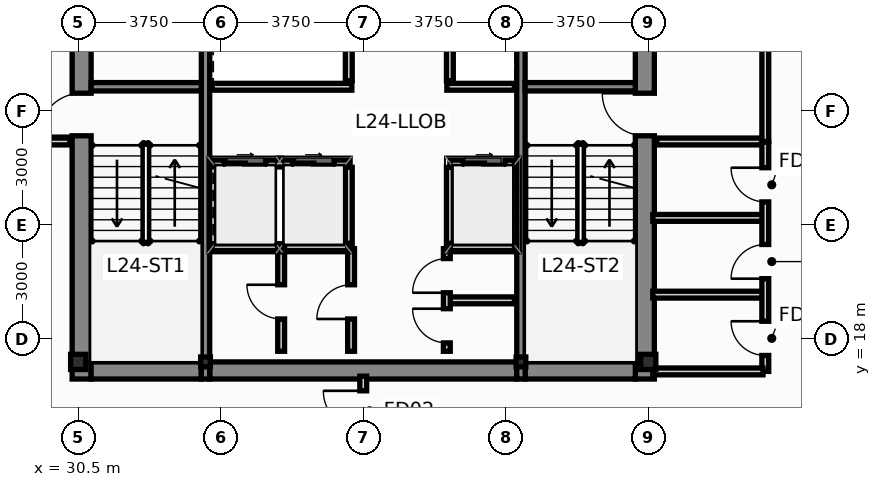
"""IFC4 building model, lengths in metres.
Left out: names, types, materials, properties, quantities, classifications, styles, units other than length and angle.
Written with IfcOpenShell. Run it as: python <this file> out.ifc"""

import sys

from ifc_helpers import new_model, si_unit, direction, frame, frame_2d, origin, origin_2d, place, context, subcontext, project, spatial, rectangle, i_section, extrude, source, transform, mapped, element, fill, save


model = new_model("IFC4")
c1 = context("Model", 3, precision=1e-05, world=origin(), true_north=direction((0.0, 1.0)))
c2 = subcontext(c1, "Body", "Model", "MODEL_VIEW")
j1 = project(units=[si_unit("LENGTHUNIT", "METRE"), si_unit("PLANEANGLEUNIT", "RADIAN")], contexts=[c1])
p1 = place(None, origin())
s1 = spatial("IfcSite", under=j1, at=p1, CompositionType="ELEMENT")
p2 = place(p1, origin())
s2 = spatial("IfcBuilding", under=s1, at=p2, CompositionType="ELEMENT")
p3 = place(p2, frame((0.0, 0.0, 94.45)))
s3 = spatial("IfcBuildingStorey", under=s2, at=p3, CompositionType="ELEMENT", Elevation=94.45)
m1 = source(origin(), c2, "Body", "SweptSolid", [
    extrude(i_section(OverallWidth=0.4, OverallDepth=0.4, WebThickness=0.02, FlangeThickness=0.032, at=origin_2d()), origin(), (0.0, 0.0, 1.0), 3.65),
])
for number, where, z_axis, x_axis in (
    (1, (30.5, 17.4, 0.0), (0.0, 0.0, 1.0), (1.0, 0.0, 0.0)),
    (2, (45.5, 17.4, 0.0), (0.0, 0.0, 1.0), (1.0, 0.0, 0.0)),
):
    element("IfcColumn", number, at=place(p3, frame(where, z_axis=z_axis, x_axis=x_axis)), inside=s3, PredefinedType="COLUMN", context=c2, shape_type="MappedRepresentation", body=[
        mapped(m1, transform((0.0, 0.0, 0.0), scale=1.0)),
    ])
m2 = source(origin(), c2, "Body", "SweptSolid", [
    extrude(i_section(OverallWidth=0.256, OverallDepth=0.26, WebThickness=0.01, FlangeThickness=0.017, at=origin_2d()), origin(), (0.0, 0.0, 1.0), 3.65),
])
for number, where, z_axis, x_axis in (
    (3, (33.85, 17.4, 0.0), (0.0, 0.0, 1.0), (1.0, 0.0, 0.0)),
    (4, (42.15, 17.4, 0.0), (0.0, 0.0, 1.0), (1.0, 0.0, 0.0)),
):
    element("IfcColumn", number, at=place(p3, frame(where, z_axis=z_axis, x_axis=x_axis)), inside=s3, PredefinedType="COLUMN", context=c2, shape_type="MappedRepresentation", body=[
        mapped(m2, transform((0.0, 0.0, 0.0), scale=1.0)),
    ])
p4 = place(p3, frame((30.59, 16.95, 0.0), z_axis=(0.0, 0.0, 1.0), x_axis=(0.0, 1.0, 0.0)))
e5 = element("IfcWall", 5, at=p4, inside=s3, PredefinedType="SHEAR", context=c2, shape_type="SweptSolid", body=[
    extrude(rectangle(XDim=13.275, YDim=0.5, at=frame_2d((6.638, 0.0))), origin(), (0.0, 0.0, 1.0), 3.65),
])
p5 = place(p4, frame((6.4, 0.0, 0.0)))
e6 = element("IfcOpeningElement", 6, at=p5, cuts=e5, PredefinedType="OPENING", context=c2, shape_type="SweptSolid", body=[
    extrude(rectangle(XDim=1.12, YDim=2.15, at=frame_2d((0.56, 1.075))), frame((0.0, 0.262, 0.0), z_axis=(0.0, -1.0, 0.0), x_axis=(1.0, 0.0, 0.0)), (0.0, 0.0, 1.0), 0.524),
])
p6 = place(p4, frame((10.85, 0.0, 0.0)))
e7 = element("IfcOpeningElement", 7, at=p6, cuts=e5, PredefinedType="OPENING", context=c2, shape_type="SweptSolid", body=[
    extrude(rectangle(XDim=1.2, YDim=2.2, at=frame_2d((0.6, 1.1))), frame((0.0, 0.262, 0.0), z_axis=(0.0, -1.0, 0.0), x_axis=(1.0, 0.0, 0.0)), (0.0, 0.0, 1.0), 0.524),
])
p7 = place(p3, frame((45.41, 16.95, 0.0), z_axis=(0.0, 0.0, 1.0), x_axis=(0.0, 1.0, 0.0)))
e8 = element("IfcWall", 8, at=p7, inside=s3, PredefinedType="SHEAR", context=c2, shape_type="SweptSolid", body=[
    extrude(rectangle(XDim=13.275, YDim=0.5, at=frame_2d((6.638, 0.0))), origin(), (0.0, 0.0, 1.0), 3.65),
])
p8 = place(p7, frame((6.4, 0.0, 0.0)))
e9 = element("IfcOpeningElement", 9, at=p8, cuts=e8, PredefinedType="OPENING", context=c2, shape_type="SweptSolid", body=[
    extrude(rectangle(XDim=1.12, YDim=2.15, at=frame_2d((0.56, 1.075))), frame((0.0, 0.262, 0.0), z_axis=(0.0, -1.0, 0.0), x_axis=(1.0, 0.0, 0.0)), (0.0, 0.0, 1.0), 0.524),
])
p9 = place(p7, frame((10.85, 0.0, 0.0)))
e10 = element("IfcOpeningElement", 10, at=p9, cuts=e8, PredefinedType="OPENING", context=c2, shape_type="SweptSolid", body=[
    extrude(rectangle(XDim=1.2, YDim=2.2, at=frame_2d((0.6, 1.1))), frame((0.0, 0.262, 0.0), z_axis=(0.0, -1.0, 0.0), x_axis=(1.0, 0.0, 0.0)), (0.0, 0.0, 1.0), 0.524),
])
p10 = place(p3, frame((30.84, 17.175, 0.0), z_axis=(0.0, 0.0, 1.0), x_axis=(1.0, 0.0, 0.0)))
e11 = element("IfcWall", 11, at=p10, inside=s3, PredefinedType="SHEAR", context=c2, shape_type="SweptSolid", body=[
    extrude(rectangle(XDim=2.9, YDim=0.45, at=frame_2d((1.45, 0.0))), origin(), (0.0, 0.0, 1.0), 3.65),
])
p11 = place(p3, frame((33.96, 17.175, 0.0), z_axis=(0.0, 0.0, 1.0), x_axis=(1.0, 0.0, 0.0)))
e12 = element("IfcWall", 12, at=p11, inside=s3, PredefinedType="SHEAR", context=c2, shape_type="SweptSolid", body=[
    extrude(rectangle(XDim=8.08, YDim=0.45, at=frame_2d((4.04, 0.0))), origin(), (0.0, 0.0, 1.0), 3.65),
])
p12 = place(p3, frame((42.26, 17.175, 0.0), z_axis=(0.0, 0.0, 1.0), x_axis=(1.0, 0.0, 0.0)))
e13 = element("IfcWall", 13, at=p12, inside=s3, PredefinedType="SHEAR", context=c2, shape_type="SweptSolid", body=[
    extrude(rectangle(XDim=2.9, YDim=0.45, at=frame_2d((1.45, 0.0))), origin(), (0.0, 0.0, 1.0), 3.65),
])
for number, where, z_axis, x_axis in (
    (14, (33.85, 16.95, 0.0), (0.0, 0.0, 1.0), (0.0, 1.0, 0.0)),
    (15, (42.15, 16.95, 0.0), (0.0, 0.0, 1.0), (0.0, 1.0, 0.0)),
):
    element("IfcWall", number, at=place(p3, frame(where, z_axis=z_axis, x_axis=x_axis)), inside=s3, PredefinedType="SHEAR", context=c2, shape_type="SweptSolid", body=[
        extrude(rectangle(XDim=13.275, YDim=0.22, at=frame_2d((6.638, 0.0))), origin(), (0.0, 0.0, 1.0), 3.65),
    ])
for number, where, z_axis, x_axis in (
    (16, (30.84, 24.64, 0.0), (0.0, 0.0, 1.0), (1.0, 0.0, 0.0)),
    (17, (42.26, 24.64, 0.0), (0.0, 0.0, 1.0), (1.0, 0.0, 0.0)),
):
    element("IfcWall", number, at=place(p3, frame(where, z_axis=z_axis, x_axis=x_axis)), inside=s3, PredefinedType="SHEAR", context=c2, shape_type="SweptSolid", body=[
        extrude(rectangle(XDim=2.9, YDim=0.22, at=frame_2d((1.45, 0.0))), origin(), (0.0, 0.0, 1.0), 3.65),
    ])
p13 = place(p3, frame((34.02, 22.62, 0.0), z_axis=(0.0, 0.0, 1.0), x_axis=(1.0, 0.0, 0.0)))
e18 = element("IfcWall", 18, at=p13, inside=s3, PredefinedType="PARTITIONING", context=c2, shape_type="SweptSolid", body=[
    extrude(rectangle(XDim=3.6, YDim=0.18, at=frame_2d((1.8, 0.0))), origin(), (0.0, 0.0, 1.0), 3.4),
])
p14 = place(p13, frame((0.32, 0.0, 0.0)))
e19 = element("IfcOpeningElement", 19, at=p14, cuts=e18, PredefinedType="OPENING", context=c2, shape_type="SweptSolid", body=[
    extrude(rectangle(XDim=1.1, YDim=2.2, at=frame_2d((0.55, 1.1))), frame((0.0, 0.102, 0.0), z_axis=(0.0, -1.0, 0.0), x_axis=(1.0, 0.0, 0.0)), (0.0, 0.0, 1.0), 0.204),
])
p15 = place(p13, frame((2.12, 0.0, 0.0)))
e20 = element("IfcOpeningElement", 20, at=p15, cuts=e18, PredefinedType="OPENING", context=c2, shape_type="SweptSolid", body=[
    extrude(rectangle(XDim=1.1, YDim=2.2, at=frame_2d((0.55, 1.1))), frame((0.0, 0.102, 0.0), z_axis=(0.0, -1.0, 0.0), x_axis=(1.0, 0.0, 0.0)), (0.0, 0.0, 1.0), 0.204),
])
p16 = place(p3, frame((40.28, 22.62, 0.0), z_axis=(0.0, 0.0, 1.0), x_axis=(1.0, 0.0, 0.0)))
e21 = element("IfcWall", 21, at=p16, inside=s3, PredefinedType="PARTITIONING", context=c2, shape_type="SweptSolid", body=[
    extrude(rectangle(XDim=1.7, YDim=0.18, at=frame_2d((0.85, 0.0))), origin(), (0.0, 0.0, 1.0), 3.4),
])
p17 = place(p16, frame((0.35, 0.0, 0.0)))
e22 = element("IfcOpeningElement", 22, at=p17, cuts=e21, PredefinedType="OPENING", context=c2, shape_type="SweptSolid", body=[
    extrude(rectangle(XDim=1.1, YDim=2.2, at=frame_2d((0.55, 1.1))), frame((0.0, 0.102, 0.0), z_axis=(0.0, -1.0, 0.0), x_axis=(1.0, 0.0, 0.0)), (0.0, 0.0, 1.0), 0.204),
])
for number, where, z_axis, x_axis in (
    (23, (37.62, 20.52, 0.0), (0.0, 0.0, 1.0), (0.0, 1.0, 0.0)),
    (24, (40.28, 20.52, 0.0), (0.0, 0.0, 1.0), (0.0, 1.0, 0.0)),
    (25, (37.62, 24.8, 0.0), (0.0, 0.0, 1.0), (0.0, 1.0, 0.0)),
    (26, (40.28, 24.8, 0.0), (0.0, 0.0, 1.0), (0.0, 1.0, 0.0)),
):
    element("IfcWall", number, at=place(p3, frame(where, z_axis=z_axis, x_axis=x_axis)), inside=s3, PredefinedType="PARTITIONING", context=c2, shape_type="SweptSolid", body=[
        extrude(rectangle(XDim=2.0, YDim=0.18, at=frame_2d((1.0, 0.0))), origin(), (0.0, 0.0, 1.0), 3.4),
    ])
p18 = place(p3, frame((34.02, 24.64, 0.0), z_axis=(0.0, 0.0, 1.0), x_axis=(1.0, 0.0, 0.0)))
e27 = element("IfcWall", 27, at=p18, inside=s3, PredefinedType="PARTITIONING", context=c2, shape_type="SweptSolid", body=[
    extrude(rectangle(XDim=3.68, YDim=0.18, at=frame_2d((1.84, 0.0))), origin(), (0.0, 0.0, 1.0), 3.4),
])
p19 = place(p3, frame((40.2, 24.64, 0.0), z_axis=(0.0, 0.0, 1.0), x_axis=(1.0, 0.0, 0.0)))
e28 = element("IfcWall", 28, at=p19, inside=s3, PredefinedType="PARTITIONING", context=c2, shape_type="SweptSolid", body=[
    extrude(rectangle(XDim=1.78, YDim=0.18, at=frame_2d((0.89, 0.0))), origin(), (0.0, 0.0, 1.0), 3.4),
])
p20 = place(p3, frame((27.52, 23.2, 0.0), z_axis=(0.0, 0.0, 1.0), x_axis=(1.0, 0.0, 0.0)))
e29 = element("IfcWall", 29, at=p20, inside=s3, PredefinedType="PARTITIONING", context=c2, shape_type="SweptSolid", body=[
    extrude(rectangle(XDim=2.76, YDim=0.18, at=frame_2d((1.38, 0.0))), origin(), (0.0, 0.0, 1.0), 3.4),
])
p21 = place(p3, frame((48.58, 23.2, 0.0), z_axis=(0.0, 0.0, 1.0), x_axis=(0.0, 1.0, 0.0)))
e30 = element("IfcWall", 30, at=p21, inside=s3, PredefinedType="PARTITIONING", context=c2, shape_type="SweptSolid", body=[
    extrude(rectangle(XDim=6.4, YDim=0.18, at=frame_2d((3.2, 0.0))), origin(), (0.0, 0.0, 1.0), 3.026),
])
p22 = place(p21, frame((2.65, 0.0, 0.0)))
e31 = element("IfcOpeningElement", 31, at=p22, cuts=e30, PredefinedType="OPENING", context=c2, shape_type="SweptSolid", body=[
    extrude(rectangle(XDim=1.05, YDim=2.15, at=frame_2d((0.525, 1.075))), frame((0.0, 0.102, 0.0), z_axis=(0.0, -1.0, 0.0), x_axis=(1.0, 0.0, 0.0)), (0.0, 0.0, 1.0), 0.204),
])
p23 = place(p3, frame((45.72, 23.2, 0.0), z_axis=(0.0, 0.0, 1.0), x_axis=(1.0, 0.0, 0.0)))
e32 = element("IfcWall", 32, at=p23, inside=s3, PredefinedType="PARTITIONING", context=c2, shape_type="SweptSolid", body=[
    extrude(rectangle(XDim=2.76, YDim=0.18, at=frame_2d((1.38, 0.0))), origin(), (0.0, 0.0, 1.0), 3.4),
])
p24 = place(p3, frame((34.02, 20.42, 0.0), z_axis=(0.0, 0.0, 1.0), x_axis=(1.0, 0.0, 0.0)))
e33 = element("IfcWall", 33, at=p24, inside=s3, PredefinedType="PARTITIONING", context=c2, shape_type="SweptSolid", body=[
    extrude(rectangle(XDim=3.64, YDim=0.18, at=frame_2d((1.82, 0.0))), origin(), (0.0, 0.0, 1.0), 3.4),
])
p25 = place(p3, frame((40.22, 20.42, 0.0), z_axis=(0.0, 0.0, 1.0), x_axis=(1.0, 0.0, 0.0)))
e34 = element("IfcWall", 34, at=p25, inside=s3, PredefinedType="PARTITIONING", context=c2, shape_type="SweptSolid", body=[
    extrude(rectangle(XDim=1.76, YDim=0.18, at=frame_2d((0.88, 0.0))), origin(), (0.0, 0.0, 1.0), 3.4),
])
p26 = place(p3, frame((35.84, 17.68, 0.0), z_axis=(0.0, 0.0, 1.0), x_axis=(0.0, 1.0, 0.0)))
e35 = element("IfcWall", 35, at=p26, inside=s3, PredefinedType="PARTITIONING", context=c2, shape_type="SweptSolid", body=[
    extrude(rectangle(XDim=2.7, YDim=0.18, at=frame_2d((1.35, 0.0))), origin(), (0.0, 0.0, 1.0), 3.4),
])
p27 = place(p26, frame((0.85, 0.0, 0.0)))
e36 = element("IfcOpeningElement", 36, at=p27, cuts=e35, PredefinedType="OPENING", context=c2, shape_type="SweptSolid", body=[
    extrude(rectangle(XDim=0.9, YDim=2.1, at=frame_2d((0.45, 1.05))), frame((0.0, 0.102, 0.0), z_axis=(0.0, -1.0, 0.0), x_axis=(1.0, 0.0, 0.0)), (0.0, 0.0, 1.0), 0.204),
])
p28 = place(p3, frame((37.68, 17.68, 0.0), z_axis=(0.0, 0.0, 1.0), x_axis=(0.0, 1.0, 0.0)))
e37 = element("IfcWall", 37, at=p28, inside=s3, PredefinedType="PARTITIONING", context=c2, shape_type="SweptSolid", body=[
    extrude(rectangle(XDim=2.7, YDim=0.18, at=frame_2d((1.35, 0.0))), origin(), (0.0, 0.0, 1.0), 3.4),
])
p29 = place(p28, frame((0.85, 0.0, 0.0)))
e38 = element("IfcOpeningElement", 38, at=p29, cuts=e37, PredefinedType="OPENING", context=c2, shape_type="SweptSolid", body=[
    extrude(rectangle(XDim=0.9, YDim=2.1, at=frame_2d((0.45, 1.05))), frame((0.0, 0.102, 0.0), z_axis=(0.0, -1.0, 0.0), x_axis=(1.0, 0.0, 0.0)), (0.0, 0.0, 1.0), 0.204),
])
p30 = place(p3, frame((40.28, 19.02, 0.0), z_axis=(0.0, 0.0, 1.0), x_axis=(1.0, 0.0, 0.0)))
e39 = element("IfcWall", 39, at=p30, inside=s3, PredefinedType="PARTITIONING", context=c2, shape_type="SweptSolid", body=[
    extrude(rectangle(XDim=1.7, YDim=0.18, at=frame_2d((0.85, 0.0))), origin(), (0.0, 0.0, 1.0), 3.4),
])
p31 = place(p3, frame((40.2, 17.68, 0.0), z_axis=(0.0, 0.0, 1.0), x_axis=(0.0, 1.0, 0.0)))
e40 = element("IfcWall", 40, at=p31, inside=s3, PredefinedType="PARTITIONING", context=c2, shape_type="SweptSolid", body=[
    extrude(rectangle(XDim=2.7, YDim=0.18, at=frame_2d((1.35, 0.0))), origin(), (0.0, 0.0, 1.0), 3.4),
])
p32 = place(p31, frame((0.22, 0.0, 0.0)))
e41 = element("IfcOpeningElement", 41, at=p32, cuts=e40, PredefinedType="OPENING", context=c2, shape_type="SweptSolid", body=[
    extrude(rectangle(XDim=0.9, YDim=2.1, at=frame_2d((0.45, 1.05))), frame((0.0, 0.102, 0.0), z_axis=(0.0, -1.0, 0.0), x_axis=(1.0, 0.0, 0.0)), (0.0, 0.0, 1.0), 0.204),
])
p33 = place(p31, frame((1.54, 0.0, 0.0)))
e42 = element("IfcOpeningElement", 42, at=p33, cuts=e40, PredefinedType="OPENING", context=c2, shape_type="SweptSolid", body=[
    extrude(rectangle(XDim=0.9, YDim=2.1, at=frame_2d((0.45, 1.05))), frame((0.0, 0.102, 0.0), z_axis=(0.0, -1.0, 0.0), x_axis=(1.0, 0.0, 0.0)), (0.0, 0.0, 1.0), 0.204),
])
for number, where, z_axis, x_axis in (
    (43, (45.62, 19.17, 0.0), (0.0, 0.0, 1.0), (1.0, 0.0, 0.0)),
    (44, (45.62, 21.19, 0.0), (0.0, 0.0, 1.0), (1.0, 0.0, 0.0)),
):
    element("IfcWall", number, at=place(p3, frame(where, z_axis=z_axis, x_axis=x_axis)), inside=s3, PredefinedType="PARTITIONING", context=c2, shape_type="SweptSolid", body=[
        extrude(rectangle(XDim=2.9, YDim=0.18, at=frame_2d((1.45, 0.0))), origin(), (0.0, 0.0, 1.0), 3.4),
    ])
p34 = place(p3, frame((48.58, 17.15, 0.0), z_axis=(0.0, 0.0, 1.0), x_axis=(0.0, 1.0, 0.0)))
e45 = element("IfcWall", 45, at=p34, inside=s3, PredefinedType="PARTITIONING", context=c2, shape_type="SweptSolid", body=[
    extrude(rectangle(XDim=6.03, YDim=0.18, at=frame_2d((3.015, 0.0))), origin(), (0.0, 0.0, 1.0), 3.026),
])
p35 = place(p34, frame((0.42, 0.0, 0.0)))
e46 = element("IfcOpeningElement", 46, at=p35, cuts=e45, PredefinedType="OPENING", context=c2, shape_type="SweptSolid", body=[
    extrude(rectangle(XDim=0.9, YDim=2.1, at=frame_2d((0.45, 1.05))), frame((0.0, 0.102, 0.0), z_axis=(0.0, -1.0, 0.0), x_axis=(1.0, 0.0, 0.0)), (0.0, 0.0, 1.0), 0.204),
])
p36 = place(p34, frame((2.44, 0.0, 0.0)))
e47 = element("IfcOpeningElement", 47, at=p36, cuts=e45, PredefinedType="OPENING", context=c2, shape_type="SweptSolid", body=[
    extrude(rectangle(XDim=0.9, YDim=2.1, at=frame_2d((0.45, 1.05))), frame((0.0, 0.102, 0.0), z_axis=(0.0, -1.0, 0.0), x_axis=(1.0, 0.0, 0.0)), (0.0, 0.0, 1.0), 0.204),
])
p37 = place(p34, frame((4.46, 0.0, 0.0)))
e48 = element("IfcOpeningElement", 48, at=p37, cuts=e45, PredefinedType="OPENING", context=c2, shape_type="SweptSolid", body=[
    extrude(rectangle(XDim=0.9, YDim=2.1, at=frame_2d((0.45, 1.05))), frame((0.0, 0.102, 0.0), z_axis=(0.0, -1.0, 0.0), x_axis=(1.0, 0.0, 0.0)), (0.0, 0.0, 1.0), 0.204),
])
p38 = place(p3, frame((45.62, 17.15, 0.0), z_axis=(0.0, 0.0, 1.0), x_axis=(1.0, 0.0, 0.0)))
e49 = element("IfcWall", 49, at=p38, inside=s3, PredefinedType="PARTITIONING", context=c2, shape_type="SweptSolid", body=[
    extrude(rectangle(XDim=2.9, YDim=0.18, at=frame_2d((1.45, 0.0))), origin(), (0.0, 0.0, 1.0), 2.783),
])
p39 = place(p3, frame((38.0, 15.205, 0.0), z_axis=(0.0, 0.0, 1.0), x_axis=(0.0, 1.0, 0.0)))
e50 = element("IfcWall", 50, at=p39, inside=s3, PredefinedType="PARTITIONING", context=c2, shape_type="SweptSolid", body=[
    extrude(rectangle(XDim=1.82, YDim=0.18, at=frame_2d((0.91, 0.0))), origin(), (0.0, 0.0, 1.0), 3.4),
])
p40 = place(p39, frame((0.385, 0.0, 0.0)))
e51 = element("IfcOpeningElement", 51, at=p40, cuts=e50, PredefinedType="OPENING", context=c2, shape_type="SweptSolid", body=[
    extrude(rectangle(XDim=1.05, YDim=2.15, at=frame_2d((0.525, 1.075))), frame((0.0, 0.102, 0.0), z_axis=(0.0, -1.0, 0.0), x_axis=(1.0, 0.0, 0.0)), (0.0, 0.0, 1.0), 0.204),
])
p41 = place(p5, origin())
e52 = element("IfcDoor", 52, at=p41, inside=s3, OperationType="SINGLE_SWING_LEFT", PredefinedType="DOOR", context=c2, shape_type="SweptSolid", body=[
    extrude(rectangle(XDim=1.12, YDim=2.15, at=frame_2d((0.56, 1.075))), frame((0.0, 0.025, 0.0), z_axis=(0.0, -1.0, 0.0), x_axis=(1.0, 0.0, 0.0)), (0.0, 0.0, 1.0), 0.05),
])
fill(e6, e52)
p42 = place(p8, origin())
e53 = element("IfcDoor", 53, at=p42, inside=s3, OperationType="SINGLE_SWING_RIGHT", PredefinedType="DOOR", context=c2, shape_type="SweptSolid", body=[
    extrude(rectangle(XDim=1.12, YDim=2.15, at=frame_2d((0.56, 1.075))), frame((0.0, 0.025, 0.0), z_axis=(0.0, -1.0, 0.0), x_axis=(1.0, 0.0, 0.0)), (0.0, 0.0, 1.0), 0.05),
])
fill(e9, e53)
p43 = place(p14, origin())
e54 = element("IfcDoor", 54, at=p43, inside=s3, OperationType="SLIDING_TO_LEFT", PredefinedType="DOOR", context=c2, shape_type="SweptSolid", body=[
    extrude(rectangle(XDim=1.1, YDim=2.2, at=frame_2d((0.55, 1.1))), frame((0.0, 0.025, 0.0), z_axis=(0.0, -1.0, 0.0), x_axis=(1.0, 0.0, 0.0)), (0.0, 0.0, 1.0), 0.05),
])
fill(e19, e54)
p44 = place(p15, origin())
e55 = element("IfcDoor", 55, at=p44, inside=s3, OperationType="SLIDING_TO_RIGHT", PredefinedType="DOOR", context=c2, shape_type="SweptSolid", body=[
    extrude(rectangle(XDim=1.1, YDim=2.2, at=frame_2d((0.55, 1.1))), frame((0.0, 0.025, 0.0), z_axis=(0.0, -1.0, 0.0), x_axis=(1.0, 0.0, 0.0)), (0.0, 0.0, 1.0), 0.05),
])
fill(e20, e55)
p45 = place(p17, origin())
e56 = element("IfcDoor", 56, at=p45, inside=s3, OperationType="SLIDING_TO_LEFT", PredefinedType="DOOR", context=c2, shape_type="SweptSolid", body=[
    extrude(rectangle(XDim=1.1, YDim=2.2, at=frame_2d((0.55, 1.1))), frame((0.0, 0.025, 0.0), z_axis=(0.0, -1.0, 0.0), x_axis=(1.0, 0.0, 0.0)), (0.0, 0.0, 1.0), 0.05),
])
fill(e22, e56)
p46 = place(p27, origin())
e57 = element("IfcDoor", 57, at=p46, inside=s3, OperationType="SINGLE_SWING_RIGHT", PredefinedType="DOOR", context=c2, shape_type="SweptSolid", body=[
    extrude(rectangle(XDim=0.9, YDim=2.1, at=frame_2d((0.45, 1.05))), frame((0.0, 0.025, 0.0), z_axis=(0.0, -1.0, 0.0), x_axis=(1.0, 0.0, 0.0)), (0.0, 0.0, 1.0), 0.05),
])
fill(e36, e57)
p47 = place(p29, origin())
e58 = element("IfcDoor", 58, at=p47, inside=s3, OperationType="SINGLE_SWING_LEFT", PredefinedType="DOOR", context=c2, shape_type="SweptSolid", body=[
    extrude(rectangle(XDim=0.9, YDim=2.1, at=frame_2d((0.45, 1.05))), frame((0.0, 0.025, 0.0), z_axis=(0.0, -1.0, 0.0), x_axis=(1.0, 0.0, 0.0)), (0.0, 0.0, 1.0), 0.05),
])
fill(e38, e58)
p48 = place(p32, origin())
e59 = element("IfcDoor", 59, at=p48, inside=s3, OperationType="SINGLE_SWING_RIGHT", PredefinedType="DOOR", context=c2, shape_type="SweptSolid", body=[
    extrude(rectangle(XDim=0.9, YDim=2.1, at=frame_2d((0.45, 1.05))), frame((0.0, 0.025, 0.0), z_axis=(0.0, -1.0, 0.0), x_axis=(1.0, 0.0, 0.0)), (0.0, 0.0, 1.0), 0.05),
])
fill(e41, e59)
p49 = place(p33, origin())
e60 = element("IfcDoor", 60, at=p49, inside=s3, OperationType="SINGLE_SWING_LEFT", PredefinedType="DOOR", context=c2, shape_type="SweptSolid", body=[
    extrude(rectangle(XDim=0.9, YDim=2.1, at=frame_2d((0.45, 1.05))), frame((0.0, 0.025, 0.0), z_axis=(0.0, -1.0, 0.0), x_axis=(1.0, 0.0, 0.0)), (0.0, 0.0, 1.0), 0.05),
])
fill(e42, e60)
p50 = place(p35, origin())
e61 = element("IfcDoor", 61, at=p50, inside=s3, OperationType="SINGLE_SWING_RIGHT", PredefinedType="DOOR", context=c2, shape_type="SweptSolid", body=[
    extrude(rectangle(XDim=0.9, YDim=2.1, at=frame_2d((0.45, 1.05))), frame((0.0, 0.025, 0.0), z_axis=(0.0, -1.0, 0.0), x_axis=(1.0, 0.0, 0.0)), (0.0, 0.0, 1.0), 0.05),
])
fill(e46, e61)
p51 = place(p36, origin())
e62 = element("IfcDoor", 62, at=p51, inside=s3, OperationType="SINGLE_SWING_LEFT", PredefinedType="DOOR", context=c2, shape_type="SweptSolid", body=[
    extrude(rectangle(XDim=0.9, YDim=2.1, at=frame_2d((0.45, 1.05))), frame((0.0, 0.025, 0.0), z_axis=(0.0, -1.0, 0.0), x_axis=(1.0, 0.0, 0.0)), (0.0, 0.0, 1.0), 0.05),
])
fill(e47, e62)
p52 = place(p37, origin())
e63 = element("IfcDoor", 63, at=p52, inside=s3, OperationType="SINGLE_SWING_RIGHT", PredefinedType="DOOR", context=c2, shape_type="SweptSolid", body=[
    extrude(rectangle(XDim=0.9, YDim=2.1, at=frame_2d((0.45, 1.05))), frame((0.0, 0.025, 0.0), z_axis=(0.0, -1.0, 0.0), x_axis=(1.0, 0.0, 0.0)), (0.0, 0.0, 1.0), 0.05),
])
fill(e48, e63)
p53 = place(p40, origin())
e64 = element("IfcDoor", 64, at=p53, inside=s3, OperationType="SINGLE_SWING_RIGHT", PredefinedType="DOOR", context=c2, shape_type="SweptSolid", body=[
    extrude(rectangle(XDim=1.05, YDim=2.15, at=frame_2d((0.525, 1.075))), frame((0.0, 0.025, 0.0), z_axis=(0.0, -1.0, 0.0), x_axis=(1.0, 0.0, 0.0)), (0.0, 0.0, 1.0), 0.05),
])
fill(e51, e64)
save(model, sys.argv[1])
